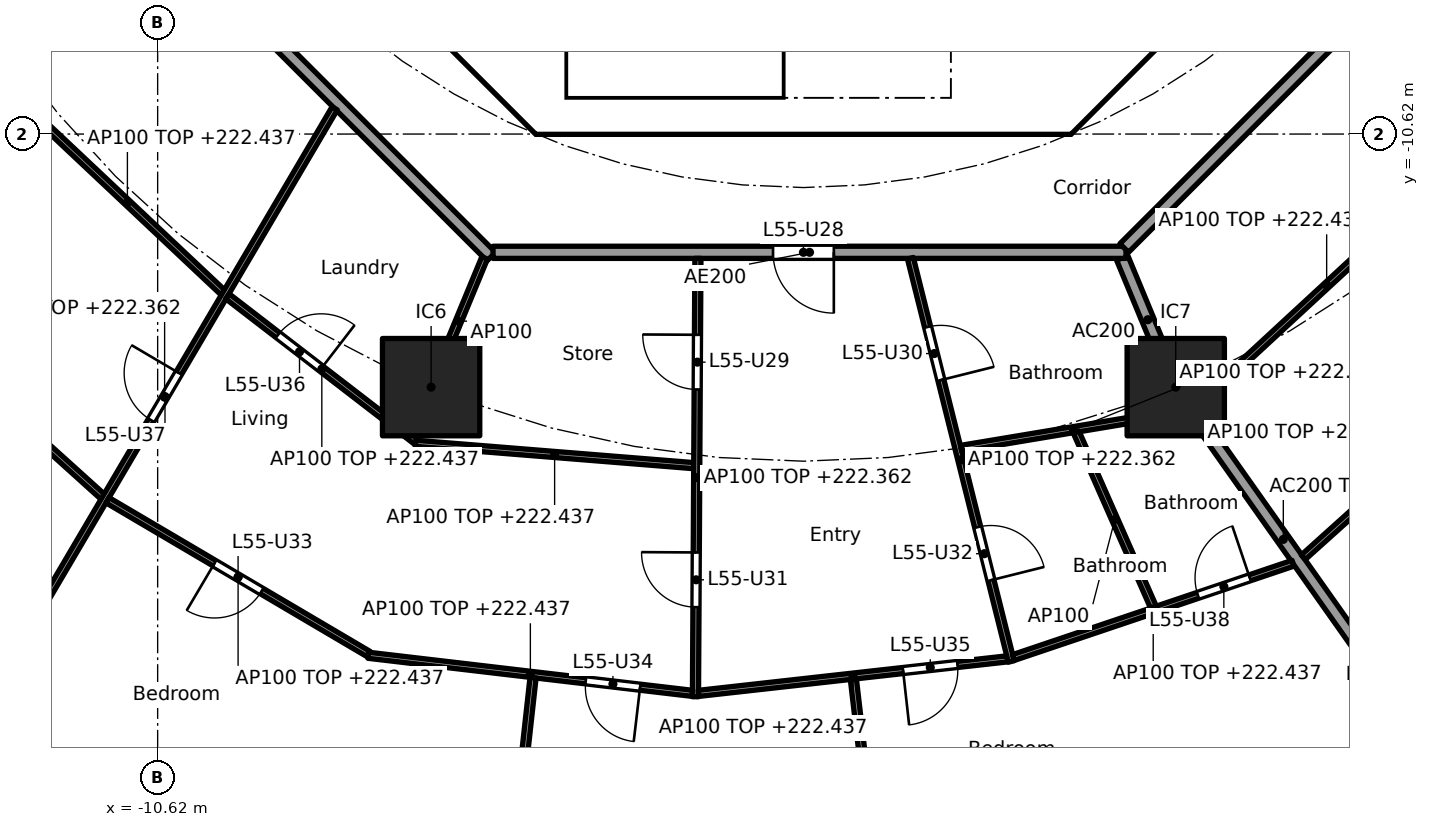
"""IFC4 building model, lengths in metres.
Left out: names, types, materials, properties, quantities, classifications, styles, units other than length and angle.
Written with IfcOpenShell. Run it as: python <this file> out.ifc"""

import sys

from ifc_helpers import new_model, si_unit, direction, frame, frame_2d, origin, origin_2d, place, context, subcontext, project, spatial, polyline, rectangle, outline, extrude, element, fill, save


model = new_model("IFC4")
c1 = context("Model", 3, precision=1e-05, world=origin(), true_north=direction((0.0, 1.0)))
c2 = subcontext(c1, "Body", "Model", "MODEL_VIEW")
j1 = project(units=[si_unit("LENGTHUNIT", "METRE"), si_unit("PLANEANGLEUNIT", "RADIAN")], contexts=[c1])
p1 = place(None, origin())
s1 = spatial("IfcSite", under=j1, at=p1, CompositionType="ELEMENT")
p2 = place(p1, origin())
s2 = spatial("IfcBuilding", under=s1, at=p2, CompositionType="ELEMENT")
p3 = place(p2, frame((0.0, 0.0, 219.6)))
s3 = spatial("IfcBuildingStorey", under=s2, at=p3, CompositionType="ELEMENT", Elevation=219.6)
for number, where, z_axis, x_axis in (
    (1, (-6.123, -14.782, 0.0), (0.0, 0.0, 1.0), (1.0, 0.0, 0.0)),
    (2, (6.123, -14.782, 0.0), (0.0, 0.0, 1.0), (1.0, 0.0, 0.0)),
):
    element("IfcColumn", number, at=place(p3, frame(where, z_axis=z_axis, x_axis=x_axis)), inside=s3, PredefinedType="COLUMN", context=c2, shape_type="SweptSolid", body=[
        extrude(rectangle(XDim=1.6, YDim=1.6, at=origin_2d()), origin(), (0.0, 0.0, 1.0), 3.7),
    ])
p4 = place(p3, frame((-9.988, -4.613, 0.0), z_axis=(0.0, 0.0, 1.0), x_axis=(0.707106781187, -0.707106781187, 0.0)))
e3 = element("IfcWall", 3, at=p4, inside=s3, PredefinedType="SHEAR", context=c2, shape_type="SweptSolid", body=[
    extrude(rectangle(XDim=7.602, YDim=0.6, at=frame_2d((3.801, 0.0))), origin(), (0.0, 0.0, 1.0), 3.44),
])
p5 = place(p4, frame((6.151, 0.0, 0.0)))
e4 = element("IfcOpeningElement", 4, at=p5, cuts=e3, PredefinedType="OPENING", context=c2, shape_type="SweptSolid", body=[
    extrude(rectangle(XDim=1.1, YDim=2.1, at=frame_2d((0.55, 1.05))), frame((0.0, 0.31, 0.0), z_axis=(0.0, -1.0, 0.0), x_axis=(1.0, 0.0, 0.0)), (0.0, 0.0, 1.0), 0.62),
])
p6 = place(p3, frame((4.613, -9.988, 0.0), z_axis=(0.0, 0.0, 1.0), x_axis=(0.707106781187, 0.707106781187, 0.0)))
e5 = element("IfcWall", 5, at=p6, inside=s3, PredefinedType="SHEAR", context=c2, shape_type="SweptSolid", body=[
    extrude(rectangle(XDim=7.602, YDim=0.6, at=frame_2d((3.801, 0.0))), origin(), (0.0, 0.0, 1.0), 3.44),
])
p7 = place(p6, frame((3.201, 0.0, 0.0)))
e6 = element("IfcOpeningElement", 6, at=p7, cuts=e5, PredefinedType="OPENING", context=c2, shape_type="SweptSolid", body=[
    extrude(rectangle(XDim=1.2, YDim=2.1, at=frame_2d((0.6, 1.05))), frame((0.0, 0.31, 0.0), z_axis=(0.0, -1.0, 0.0), x_axis=(1.0, 0.0, 0.0)), (0.0, 0.0, 1.0), 0.62),
])
p8 = place(p3, frame((4.0, -10.025, 0.0), z_axis=(0.0, 0.0, 1.0), x_axis=(0.0, 1.0, 0.0)))
e7 = element("IfcWall", 7, at=p8, inside=s3, PredefinedType="SOLIDWALL", context=c2, shape_type="SweptSolid", body=[
    extrude(rectangle(XDim=3.0, YDim=0.2, at=frame_2d((1.5, 0.0))), origin(), (0.0, 0.0, 1.0), 3.44),
])
p9 = place(p8, frame((0.975, 0.0, 0.0)))
e8 = element("IfcOpeningElement", 8, at=p9, cuts=e7, PredefinedType="OPENING", context=c2, shape_type="SweptSolid", body=[
    extrude(rectangle(XDim=1.1, YDim=2.1, at=frame_2d((0.55, 1.05))), frame((0.0, 0.11, 0.0), z_axis=(0.0, -1.0, 0.0), x_axis=(1.0, 0.0, 0.0)), (0.0, 0.0, 1.0), 0.22),
])
p10 = place(p3, origin())
e9 = element("IfcWall", 9, at=p10, inside=s3, PredefinedType="SHEAR", context=c2, shape_type="SweptSolid", body=[
    extrude(outline(polyline([(-4.152, -10.025), (4.152, -10.025), (4.401, -9.776), (4.825, -10.2), (4.401, -10.625), (-4.401, -10.625), (-4.825, -10.2), (-4.401, -9.776), (-4.152, -10.025)])), origin(), (0.0, 0.0, 1.0), 3.44),
])
p11 = place(p3, origin())
e10 = element("IfcWall", 10, at=p11, inside=s3, PredefinedType="SOLIDWALL", context=c2, shape_type="SweptSolid", body=[
    extrude(outline(polyline([(-3.9, -10.025), (-4.1, -10.025), (-4.1, -7.025), (-3.9, -7.025), (-3.9, -10.025)])), origin(), (0.0, 0.0, 1.0), 3.44),
])
p12 = place(p3, frame((5.243, -12.657, 0.0), z_axis=(0.0, 0.0, 1.0), x_axis=(0.382691608661, -0.923876145736, 0.0)))
e11 = element("IfcWall", 11, at=p12, inside=s3, PredefinedType="PARTITIONING", context=c2, shape_type="SweptSolid", body=[
    extrude(rectangle(XDim=2.2, YDim=0.2, at=frame_2d((1.1, 0.0))), origin(), (0.0, 0.0, 1.0), 3.44),
])
p13 = place(p3, frame((6.152, -14.823, 0.0), z_axis=(0.0, 0.0, 1.0), x_axis=(0.576994695158, -0.816747893637, 0.0)))
e12 = element("IfcWall", 12, at=p13, inside=s3, PredefinedType="PARTITIONING", context=c2, shape_type="SweptSolid", body=[
    extrude(rectangle(XDim=6.03, YDim=0.2, at=frame_2d((3.015, 0.0))), origin(), (0.0, 0.0, 1.0), 2.837),
])
p14 = place(p3, frame((-12.635, -5.134, 0.0), z_axis=(0.0, 0.0, 1.0), x_axis=(0.707106781187, -0.707106781187, 0.0)))
e13 = element("IfcWall", 13, at=p14, inside=s3, PredefinedType="PARTITIONING", context=c2, shape_type="SweptSolid", body=[
    extrude(rectangle(XDim=10.609, YDim=0.2, at=frame_2d((5.305, 0.0))), origin(), (0.0, 0.0, 1.0), 3.44),
])
p15 = place(p3, frame((-5.104, -12.565, 0.0), z_axis=(0.0, 0.0, 1.0), x_axis=(1.0, 0.0, 0.0)))
e14 = element("IfcWall", 14, at=p15, inside=s3, PredefinedType="PARTITIONING", context=c2, shape_type="SweptSolid", body=[
    extrude(rectangle(XDim=10.409, YDim=0.2, at=frame_2d((5.205, 0.0))), origin(), (0.0, 0.0, 1.0), 3.44),
])
p16 = place(p15, frame((4.604, 0.0, 0.0)))
e15 = element("IfcOpeningElement", 15, at=p16, cuts=e14, PredefinedType="OPENING", context=c2, shape_type="SweptSolid", body=[
    extrude(rectangle(XDim=1.0, YDim=2.1, at=frame_2d((0.5, 1.05))), frame((0.0, 0.11, 0.0), z_axis=(0.0, -1.0, 0.0), x_axis=(1.0, 0.0, 0.0)), (0.0, 0.0, 1.0), 0.22),
])
p17 = place(p3, frame((5.275, -12.494, 0.0), z_axis=(0.0, 0.0, 1.0), x_axis=(0.707106781187, 0.707106781187, 0.0)))
e16 = element("IfcWall", 16, at=p17, inside=s3, PredefinedType="PARTITIONING", context=c2, shape_type="SweptSolid", body=[
    extrude(rectangle(XDim=10.409, YDim=0.2, at=frame_2d((5.205, 0.0))), origin(), (0.0, 0.0, 1.0), 3.44),
])
p18 = place(p3, frame((-12.688, -10.27, 0.0), z_axis=(0.0, 0.0, 1.0), x_axis=(0.728268142903, -0.685292282192, 0.0)))
e17 = element("IfcWall", 17, at=p18, inside=s3, PredefinedType="PARTITIONING", context=c2, shape_type="SweptSolid", body=[
    extrude(rectangle(XDim=4.312, YDim=0.1, at=frame_2d((2.156, 0.0))), origin(), (0.0, 0.0, 1.0), 2.837),
])
p19 = place(p3, frame((-15.474, -13.019, 0.0), z_axis=(0.0, 0.0, 1.0), x_axis=(0.742348572616, -0.670013878017, 0.0)))
e18 = element("IfcWall", 18, at=p19, inside=s3, PredefinedType="PARTITIONING", context=c2, shape_type="SweptSolid", body=[
    extrude(rectangle(XDim=5.319, YDim=0.1, at=frame_2d((2.66, 0.0))), origin(), (0.0, 0.0, 1.0), 2.837),
])
p20 = place(p3, frame((-7.709, -10.198, 0.0), z_axis=(0.0, 0.0, 1.0), x_axis=(-0.507355901053, -0.8617366127, 0.0)))
e19 = element("IfcWall", 19, at=p20, inside=s3, PredefinedType="PARTITIONING", context=c2, shape_type="SweptSolid", body=[
    extrude(rectangle(XDim=11.025, YDim=0.1, at=frame_2d((5.512, 0.0))), origin(), (0.0, 0.0, 1.0), 2.762),
])
p21 = place(p20, frame((5.05, 0.0, 0.0)))
e20 = element("IfcOpeningElement", 20, at=p21, cuts=e19, PredefinedType="OPENING", context=c2, shape_type="SweptSolid", body=[
    extrude(rectangle(XDim=0.9, YDim=2.1, at=frame_2d((0.45, 1.05))), frame((0.0, 0.06, 0.0), z_axis=(0.0, -1.0, 0.0), x_axis=(1.0, 0.0, 0.0)), (0.0, 0.0, 1.0), 0.12),
])
p22 = place(p3, frame((-9.471, -13.289, 0.0), z_axis=(0.0, 0.0, 1.0), x_axis=(0.7922205419, -0.61023488346, 0.0)))
e21 = element("IfcWall", 21, at=p22, inside=s3, PredefinedType="PARTITIONING", context=c2, shape_type="SweptSolid", body=[
    extrude(rectangle(XDim=3.916, YDim=0.1, at=frame_2d((1.958, 0.0))), origin(), (0.0, 0.0, 1.0), 2.837),
])
p23 = place(p22, frame((1.045, 0.0, 0.0)))
e22 = element("IfcOpeningElement", 22, at=p23, cuts=e21, PredefinedType="OPENING", context=c2, shape_type="SweptSolid", body=[
    extrude(rectangle(XDim=0.9, YDim=2.1, at=frame_2d((0.45, 1.05))), frame((0.0, 0.06, 0.0), z_axis=(0.0, -1.0, 0.0), x_axis=(1.0, 0.0, 0.0)), (0.0, 0.0, 1.0), 0.12),
])
p24 = place(p3, frame((-11.445, -16.641, 0.0), z_axis=(0.0, 0.0, 1.0), x_axis=(0.861562560957, -0.507651409489, 0.0)))
e23 = element("IfcWall", 23, at=p24, inside=s3, PredefinedType="PARTITIONING", context=c2, shape_type="SweptSolid", body=[
    extrude(rectangle(XDim=4.985, YDim=0.1, at=frame_2d((2.492, 0.0))), origin(), (0.0, 0.0, 1.0), 2.837),
])
p25 = place(p24, frame((2.042, 0.0, 0.0)))
e24 = element("IfcOpeningElement", 24, at=p25, cuts=e23, PredefinedType="OPENING", context=c2, shape_type="SweptSolid", body=[
    extrude(rectangle(XDim=0.9, YDim=2.1, at=frame_2d((0.45, 1.05))), frame((0.0, 0.06, 0.0), z_axis=(0.0, -1.0, 0.0), x_axis=(1.0, 0.0, 0.0)), (0.0, 0.0, 1.0), 0.12),
])
p26 = place(p3, frame((-5.243, -12.657, 0.0), z_axis=(0.0, 0.0, 1.0), x_axis=(-0.382719158442, -0.923864733477, 0.0)))
e25 = element("IfcWall", 25, at=p26, inside=s3, PredefinedType="PARTITIONING", context=c2, shape_type="SweptSolid", body=[
    extrude(rectangle(XDim=2.25, YDim=0.1, at=frame_2d((1.125, 0.0))), origin(), (0.0, 0.0, 1.0), 3.44),
])
p27 = place(p3, frame((-6.379, -15.705, 0.0), z_axis=(0.0, 0.0, 1.0), x_axis=(0.996786462227, -0.080104611105, 0.0)))
e26 = element("IfcWall", 26, at=p27, inside=s3, PredefinedType="PARTITIONING", context=c2, shape_type="SweptSolid", body=[
    extrude(rectangle(XDim=4.59, YDim=0.1, at=frame_2d((2.295, 0.0))), origin(), (0.0, 0.0, 1.0), 2.837),
])
p28 = place(p3, frame((-7.156, -19.191, 0.0), z_axis=(0.0, 0.0, 1.0), x_axis=(0.993172627718, -0.116653896424, 0.0)))
e27 = element("IfcWall", 27, at=p28, inside=s3, PredefinedType="PARTITIONING", context=c2, shape_type="SweptSolid", body=[
    extrude(rectangle(XDim=5.368, YDim=0.1, at=frame_2d((2.684, 0.0))), origin(), (0.0, 0.0, 1.0), 2.837),
])
p29 = place(p28, frame((3.601, 0.0, 0.0)))
e28 = element("IfcOpeningElement", 28, at=p29, cuts=e27, PredefinedType="OPENING", context=c2, shape_type="SweptSolid", body=[
    extrude(rectangle(XDim=0.9, YDim=2.1, at=frame_2d((0.45, 1.05))), frame((0.0, 0.06, 0.0), z_axis=(0.0, -1.0, 0.0), x_axis=(1.0, 0.0, 0.0)), (0.0, 0.0, 1.0), 0.12),
])
p30 = place(p3, frame((-4.447, -19.56, 0.0), z_axis=(0.0, 0.0, 1.0), x_axis=(-0.109897425445, -0.993942933915, 0.0)))
e29 = element("IfcWall", 29, at=p30, inside=s3, PredefinedType="PARTITIONING", context=c2, shape_type="SweptSolid", body=[
    extrude(rectangle(XDim=4.465, YDim=0.1, at=frame_2d((2.233, 0.0))), origin(), (0.0, 0.0, 1.0), 2.983),
])
p31 = place(p3, frame((-1.735, -12.665, 0.0), z_axis=(0.0, 0.0, 1.0), x_axis=(-0.005554152823, -0.999984575574, 0.0)))
e30 = element("IfcWall", 30, at=p31, inside=s3, PredefinedType="PARTITIONING", context=c2, shape_type="SweptSolid", body=[
    extrude(rectangle(XDim=7.209, YDim=0.1, at=frame_2d((3.604, 0.0))), origin(), (0.0, 0.0, 1.0), 2.762),
])
p32 = place(p31, frame((1.256, 0.0, 0.0)))
e31 = element("IfcOpeningElement", 31, at=p32, cuts=e30, PredefinedType="OPENING", context=c2, shape_type="SweptSolid", body=[
    extrude(rectangle(XDim=0.9, YDim=2.1, at=frame_2d((0.45, 1.05))), frame((0.0, 0.06, 0.0), z_axis=(0.0, -1.0, 0.0), x_axis=(1.0, 0.0, 0.0)), (0.0, 0.0, 1.0), 0.12),
])
p33 = place(p31, frame((4.836, 0.0, 0.0)))
e32 = element("IfcOpeningElement", 32, at=p33, cuts=e30, PredefinedType="OPENING", context=c2, shape_type="SweptSolid", body=[
    extrude(rectangle(XDim=0.9, YDim=2.1, at=frame_2d((0.45, 1.05))), frame((0.0, 0.06, 0.0), z_axis=(0.0, -1.0, 0.0), x_axis=(1.0, 0.0, 0.0)), (0.0, 0.0, 1.0), 0.12),
])
p34 = place(p3, frame((-1.726, -19.818, 0.0), z_axis=(0.0, 0.0, 1.0), x_axis=(0.99381893047, 0.111013212902, 0.0)))
e33 = element("IfcWall", 33, at=p34, inside=s3, PredefinedType="PARTITIONING", context=c2, shape_type="SweptSolid", body=[
    extrude(rectangle(XDim=5.113, YDim=0.1, at=frame_2d((2.557, 0.0))), origin(), (0.0, 0.0, 1.0), 2.837),
])
p35 = place(p34, frame((3.385, 0.0, 0.0)))
e34 = element("IfcOpeningElement", 34, at=p35, cuts=e33, PredefinedType="OPENING", context=c2, shape_type="SweptSolid", body=[
    extrude(rectangle(XDim=0.9, YDim=2.1, at=frame_2d((0.45, 1.05))), frame((0.0, 0.06, 0.0), z_axis=(0.0, -1.0, 0.0), x_axis=(1.0, 0.0, 0.0)), (0.0, 0.0, 1.0), 0.12),
])
p36 = place(p3, frame((0.821, -19.584, 0.0), z_axis=(0.0, 0.0, 1.0), x_axis=(0.116120946841, -0.993235080786, 0.0)))
e35 = element("IfcWall", 35, at=p36, inside=s3, PredefinedType="PARTITIONING", context=c2, shape_type="SweptSolid", body=[
    extrude(rectangle(XDim=4.445, YDim=0.1, at=frame_2d((2.222, 0.0))), origin(), (0.0, 0.0, 1.0), 2.983),
])
p37 = place(p3, frame((1.759, -12.662, 0.0), z_axis=(0.0, 0.0, 1.0), x_axis=(0.242653275363, -0.970113079984, 0.0)))
e36 = element("IfcWall", 36, at=p37, inside=s3, PredefinedType="PARTITIONING", context=c2, shape_type="SweptSolid", body=[
    extrude(rectangle(XDim=6.836, YDim=0.1, at=frame_2d((3.418, 0.0))), origin(), (0.0, 0.0, 1.0), 2.762),
])
p38 = place(p37, frame((1.166, 0.0, 0.0)))
e37 = element("IfcOpeningElement", 37, at=p38, cuts=e36, PredefinedType="OPENING", context=c2, shape_type="SweptSolid", body=[
    extrude(rectangle(XDim=0.9, YDim=2.1, at=frame_2d((0.45, 1.05))), frame((0.0, 0.06, 0.0), z_axis=(0.0, -1.0, 0.0), x_axis=(1.0, 0.0, 0.0)), (0.0, 0.0, 1.0), 0.12),
])
p39 = place(p37, frame((4.559, 0.0, 0.0)))
e38 = element("IfcOpeningElement", 38, at=p39, cuts=e36, PredefinedType="OPENING", context=c2, shape_type="SweptSolid", body=[
    extrude(rectangle(XDim=0.9, YDim=2.1, at=frame_2d((0.45, 1.05))), frame((0.0, 0.06, 0.0), z_axis=(0.0, -1.0, 0.0), x_axis=(1.0, 0.0, 0.0)), (0.0, 0.0, 1.0), 0.12),
])
p40 = place(p3, frame((2.593, -15.789, 0.0), z_axis=(0.0, 0.0, 1.0), x_axis=(0.986385117656, 0.164451815639, 0.0)))
e39 = element("IfcWall", 39, at=p40, inside=s3, PredefinedType="PARTITIONING", context=c2, shape_type="SweptSolid", body=[
    extrude(rectangle(XDim=3.747, YDim=0.1, at=frame_2d((1.874, 0.0))), origin(), (0.0, 0.0, 1.0), 2.837),
])
p41 = place(p3, frame((3.453, -19.229, 0.0), z_axis=(0.0, 0.0, 1.0), x_axis=(0.947565610716, 0.31956128268, 0.0)))
e40 = element("IfcWall", 40, at=p41, inside=s3, PredefinedType="PARTITIONING", context=c2, shape_type="SweptSolid", body=[
    extrude(rectangle(XDim=4.853, YDim=0.1, at=frame_2d((2.426, 0.0))), origin(), (0.0, 0.0, 1.0), 2.837),
])
p42 = place(p41, frame((3.202, 0.0, 0.0)))
e41 = element("IfcOpeningElement", 41, at=p42, cuts=e40, PredefinedType="OPENING", context=c2, shape_type="SweptSolid", body=[
    extrude(rectangle(XDim=0.9, YDim=2.1, at=frame_2d((0.45, 1.05))), frame((0.0, 0.06, 0.0), z_axis=(0.0, -1.0, 0.0), x_axis=(1.0, 0.0, 0.0)), (0.0, 0.0, 1.0), 0.12),
])
p43 = place(p3, frame((4.485, -15.522, 0.0), z_axis=(0.0, 0.0, 1.0), x_axis=(0.40391918208, -0.914794673327, 0.0)))
e42 = element("IfcWall", 42, at=p43, inside=s3, PredefinedType="PARTITIONING", context=c2, shape_type="SweptSolid", body=[
    extrude(rectangle(XDim=3.146, YDim=0.1, at=frame_2d((1.573, 0.0))), origin(), (0.0, 0.0, 1.0), 3.44),
])
p44 = place(p3, frame((6.461, -15.088, 0.0), z_axis=(0.0, 0.0, 1.0), x_axis=(0.73461579427, 0.678483334217, 0.0)))
e43 = element("IfcWall", 43, at=p44, inside=s3, PredefinedType="PARTITIONING", context=c2, shape_type="SweptSolid", body=[
    extrude(rectangle(XDim=5.837, YDim=0.1, at=frame_2d((2.918, 0.0))), origin(), (0.0, 0.0, 1.0), 2.837),
])
p45 = place(p3, frame((8.22, -17.579, 0.0), z_axis=(0.0, 0.0, 1.0), x_axis=(0.743696370895, 0.668517544958, 0.0)))
e44 = element("IfcWall", 44, at=p45, inside=s3, PredefinedType="PARTITIONING", context=c2, shape_type="SweptSolid", body=[
    extrude(rectangle(XDim=6.125, YDim=0.1, at=frame_2d((3.062, 0.0))), origin(), (0.0, 0.0, 1.0), 2.837),
])
p46 = place(p5, origin())
e45 = element("IfcDoor", 45, at=p46, inside=s3, OperationType="SINGLE_SWING_RIGHT", PredefinedType="DOOR", context=c2, shape_type="SweptSolid", body=[
    extrude(rectangle(XDim=1.1, YDim=2.1, at=frame_2d((0.55, 1.05))), frame((0.0, 0.025, 0.0), z_axis=(0.0, -1.0, 0.0), x_axis=(1.0, 0.0, 0.0)), (0.0, 0.0, 1.0), 0.05),
])
fill(e4, e45)
p47 = place(p16, frame((1.0, 0.0, 0.0), x_axis=(-1.0, 0.0, 0.0)))
e46 = element("IfcDoor", 46, at=p47, inside=s3, OperationType="SINGLE_SWING_LEFT", PredefinedType="DOOR", context=c2, shape_type="SweptSolid", body=[
    extrude(rectangle(XDim=1.0, YDim=2.1, at=frame_2d((0.5, 1.05))), frame((0.0, 0.025, 0.0), z_axis=(0.0, -1.0, 0.0), x_axis=(1.0, 0.0, 0.0)), (0.0, 0.0, 1.0), 0.05),
])
fill(e15, e46)
p48 = place(p32, frame((0.9, 0.0, 0.0), x_axis=(-1.0, 0.0, 0.0)))
e47 = element("IfcDoor", 47, at=p48, inside=s3, OperationType="SINGLE_SWING_RIGHT", PredefinedType="DOOR", context=c2, shape_type="SweptSolid", body=[
    extrude(rectangle(XDim=0.9, YDim=2.1, at=frame_2d((0.45, 1.05))), frame((0.0, 0.025, 0.0), z_axis=(0.0, -1.0, 0.0), x_axis=(1.0, 0.0, 0.0)), (0.0, 0.0, 1.0), 0.05),
])
fill(e31, e47)
p49 = place(p38, origin())
e48 = element("IfcDoor", 48, at=p49, inside=s3, OperationType="SINGLE_SWING_RIGHT", PredefinedType="DOOR", context=c2, shape_type="SweptSolid", body=[
    extrude(rectangle(XDim=0.9, YDim=2.1, at=frame_2d((0.45, 1.05))), frame((0.0, 0.025, 0.0), z_axis=(0.0, -1.0, 0.0), x_axis=(1.0, 0.0, 0.0)), (0.0, 0.0, 1.0), 0.05),
])
fill(e37, e48)
p50 = place(p33, frame((0.9, 0.0, 0.0), x_axis=(-1.0, 0.0, 0.0)))
e49 = element("IfcDoor", 49, at=p50, inside=s3, OperationType="SINGLE_SWING_RIGHT", PredefinedType="DOOR", context=c2, shape_type="SweptSolid", body=[
    extrude(rectangle(XDim=0.9, YDim=2.1, at=frame_2d((0.45, 1.05))), frame((0.0, 0.025, 0.0), z_axis=(0.0, -1.0, 0.0), x_axis=(1.0, 0.0, 0.0)), (0.0, 0.0, 1.0), 0.05),
])
fill(e32, e49)
p51 = place(p39, origin())
e50 = element("IfcDoor", 50, at=p51, inside=s3, OperationType="SINGLE_SWING_RIGHT", PredefinedType="DOOR", context=c2, shape_type="SweptSolid", body=[
    extrude(rectangle(XDim=0.9, YDim=2.1, at=frame_2d((0.45, 1.05))), frame((0.0, 0.025, 0.0), z_axis=(0.0, -1.0, 0.0), x_axis=(1.0, 0.0, 0.0)), (0.0, 0.0, 1.0), 0.05),
])
fill(e38, e50)
p52 = place(p25, frame((0.9, 0.0, 0.0), x_axis=(-1.0, 0.0, 0.0)))
e51 = element("IfcDoor", 51, at=p52, inside=s3, OperationType="SINGLE_SWING_RIGHT", PredefinedType="DOOR", context=c2, shape_type="SweptSolid", body=[
    extrude(rectangle(XDim=0.9, YDim=2.1, at=frame_2d((0.45, 1.05))), frame((0.0, 0.025, 0.0), z_axis=(0.0, -1.0, 0.0), x_axis=(1.0, 0.0, 0.0)), (0.0, 0.0, 1.0), 0.05),
])
fill(e24, e51)
p53 = place(p29, frame((0.9, 0.0, 0.0), x_axis=(-1.0, 0.0, 0.0)))
e52 = element("IfcDoor", 52, at=p53, inside=s3, OperationType="SINGLE_SWING_LEFT", PredefinedType="DOOR", context=c2, shape_type="SweptSolid", body=[
    extrude(rectangle(XDim=0.9, YDim=2.1, at=frame_2d((0.45, 1.05))), frame((0.0, 0.025, 0.0), z_axis=(0.0, -1.0, 0.0), x_axis=(1.0, 0.0, 0.0)), (0.0, 0.0, 1.0), 0.05),
])
fill(e28, e52)
p54 = place(p35, frame((0.9, 0.0, 0.0), x_axis=(-1.0, 0.0, 0.0)))
e53 = element("IfcDoor", 53, at=p54, inside=s3, OperationType="SINGLE_SWING_RIGHT", PredefinedType="DOOR", context=c2, shape_type="SweptSolid", body=[
    extrude(rectangle(XDim=0.9, YDim=2.1, at=frame_2d((0.45, 1.05))), frame((0.0, 0.025, 0.0), z_axis=(0.0, -1.0, 0.0), x_axis=(1.0, 0.0, 0.0)), (0.0, 0.0, 1.0), 0.05),
])
fill(e34, e53)
p55 = place(p23, origin())
e54 = element("IfcDoor", 54, at=p55, inside=s3, OperationType="SINGLE_SWING_RIGHT", PredefinedType="DOOR", context=c2, shape_type="SweptSolid", body=[
    extrude(rectangle(XDim=0.9, YDim=2.1, at=frame_2d((0.45, 1.05))), frame((0.0, 0.025, 0.0), z_axis=(0.0, -1.0, 0.0), x_axis=(1.0, 0.0, 0.0)), (0.0, 0.0, 1.0), 0.05),
])
fill(e22, e54)
p56 = place(p21, frame((0.9, 0.0, 0.0), x_axis=(-1.0, 0.0, 0.0)))
e55 = element("IfcDoor", 55, at=p56, inside=s3, OperationType="SINGLE_SWING_RIGHT", PredefinedType="DOOR", context=c2, shape_type="SweptSolid", body=[
    extrude(rectangle(XDim=0.9, YDim=2.1, at=frame_2d((0.45, 1.05))), frame((0.0, 0.025, 0.0), z_axis=(0.0, -1.0, 0.0), x_axis=(1.0, 0.0, 0.0)), (0.0, 0.0, 1.0), 0.05),
])
fill(e20, e55)
p57 = place(p42, origin())
e56 = element("IfcDoor", 56, at=p57, inside=s3, OperationType="SINGLE_SWING_RIGHT", PredefinedType="DOOR", context=c2, shape_type="SweptSolid", body=[
    extrude(rectangle(XDim=0.9, YDim=2.1, at=frame_2d((0.45, 1.05))), frame((0.0, 0.025, 0.0), z_axis=(0.0, -1.0, 0.0), x_axis=(1.0, 0.0, 0.0)), (0.0, 0.0, 1.0), 0.05),
])
fill(e41, e56)
save(model, sys.argv[1])
